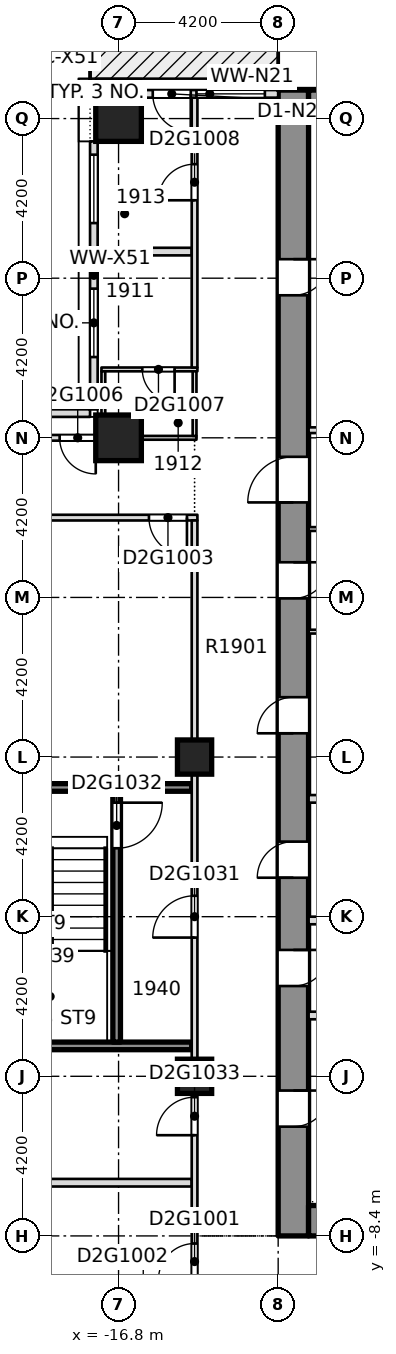
"""IFC4 building model, lengths in metres.
Left out: names, types, materials, properties, quantities, classifications, styles, units other than length and angle.
Written with IfcOpenShell. Run it as: python <this file> out.ifc"""

import sys

from ifc_helpers import new_model, si_unit, direction, frame, frame_2d, origin, origin_2d, place, context, subcontext, project, spatial, rectangle, extrude, element, fill, save


model = new_model("IFC4")
c1 = context("Model", 3, precision=1e-05, world=origin(), true_north=direction((0.0, 1.0)))
c2 = subcontext(c1, "Body", "Model", "MODEL_VIEW")
j1 = project(units=[si_unit("LENGTHUNIT", "METRE"), si_unit("PLANEANGLEUNIT", "RADIAN")], contexts=[c1])
p1 = place(None, origin())
s1 = spatial("IfcSite", under=j1, at=p1, CompositionType="ELEMENT")
p2 = place(p1, origin())
s2 = spatial("IfcBuilding", under=s1, at=p2, CompositionType="ELEMENT")
p3 = place(p2, frame((0.0, 0.0, 75.9)))
s3 = spatial("IfcBuildingStorey", under=s2, at=p3, CompositionType="ELEMENT", Elevation=75.9)
p4 = place(p3, frame((-12.15, -8.4, -0.5), z_axis=(0.0, 0.0, 1.0), x_axis=(0.0, 1.0, 0.0)))
e1 = element("IfcWall", 1, at=p4, inside=s3, PredefinedType="SHEAR", context=c2, shape_type="SweptSolid", body=[
    extrude(rectangle(XDim=30.15, YDim=0.9, at=frame_2d((15.075, 0.0))), origin(), (0.0, 0.0, 1.0), 4.68),
])
p5 = place(p4, frame((3.925, 0.0, 0.5)))
e2 = element("IfcOpeningElement", 2, at=p5, cuts=e1, PredefinedType="OPENING", context=c2, shape_type="SweptSolid", body=[
    extrude(rectangle(XDim=0.95, YDim=2.1, at=frame_2d((0.475, 1.05))), frame((0.0, 0.46, 0.0), z_axis=(0.0, -1.0, 0.0), x_axis=(1.0, 0.0, 0.0)), (0.0, 0.0, 1.0), 0.92),
])
p6 = place(p4, frame((9.175, 0.0, 0.5)))
e3 = element("IfcOpeningElement", 3, at=p6, cuts=e1, PredefinedType="OPENING", context=c2, shape_type="SweptSolid", body=[
    extrude(rectangle(XDim=0.95, YDim=2.1, at=frame_2d((0.475, 1.05))), frame((0.0, 0.46, 0.0), z_axis=(0.0, -1.0, 0.0), x_axis=(1.0, 0.0, 0.0)), (0.0, 0.0, 1.0), 0.92),
])
p7 = place(p4, frame((14.525, 0.0, 0.5)))
e4 = element("IfcOpeningElement", 4, at=p7, cuts=e1, PredefinedType="OPENING", context=c2, shape_type="SweptSolid", body=[
    extrude(rectangle(XDim=0.95, YDim=2.1, at=frame_2d((0.475, 1.05))), frame((0.0, 0.46, 0.0), z_axis=(0.0, -1.0, 0.0), x_axis=(1.0, 0.0, 0.0)), (0.0, 0.0, 1.0), 0.92),
])
p8 = place(p4, frame((22.225, 0.0, 0.5)))
e5 = element("IfcOpeningElement", 5, at=p8, cuts=e1, PredefinedType="OPENING", context=c2, shape_type="SweptSolid", body=[
    extrude(rectangle(XDim=0.95, YDim=2.1, at=frame_2d((0.475, 1.05))), frame((0.0, 0.46, 0.0), z_axis=(0.0, -1.0, 0.0), x_axis=(1.0, 0.0, 0.0)), (0.0, 0.0, 1.0), 0.92),
])
p9 = place(p4, frame((26.25, 0.0, 0.5)))
e6 = element("IfcOpeningElement", 6, at=p9, cuts=e1, PredefinedType="OPENING", context=c2, shape_type="SweptSolid", body=[
    extrude(rectangle(XDim=0.95, YDim=2.1, at=frame_2d((0.475, 1.05))), frame((0.0, 0.46, 0.0), z_axis=(0.0, -1.0, 0.0), x_axis=(1.0, 0.0, 0.0)), (0.0, 0.0, 1.0), 0.92),
])
p10 = place(p4, frame((19.3, 0.0, 0.5)))
e7 = element("IfcOpeningElement", 7, at=p10, cuts=e1, PredefinedType="OPENING", context=c2, shape_type="SweptSolid", body=[
    extrude(rectangle(XDim=1.2, YDim=2.1, at=frame_2d((0.6, 1.05))), frame((0.0, 0.46, 0.0), z_axis=(0.0, -1.0, 0.0), x_axis=(1.0, 0.0, 0.0)), (0.0, 0.0, 1.0), 0.92),
])
p11 = place(p3, frame((-11.7, -7.95, -0.5), z_axis=(0.0, 0.0, 1.0), x_axis=(1.0, 0.0, 0.0)))
e8 = element("IfcWall", 8, at=p11, inside=s3, PredefinedType="SHEAR", context=c2, shape_type="SweptSolid", body=[
    extrude(rectangle(XDim=23.4, YDim=0.9, at=frame_2d((11.7, 0.0))), origin(), (0.0, 0.0, 1.0), 4.68),
])
p12 = place(p11, frame((6.95, 0.0, 0.5)))
e9 = element("IfcOpeningElement", 9, at=p12, cuts=e8, PredefinedType="OPENING", context=c2, shape_type="SweptSolid", body=[
    extrude(rectangle(XDim=1.8, YDim=2.1, at=frame_2d((0.9, 1.05))), frame((0.0, 0.46, 0.0), z_axis=(0.0, -1.0, 0.0), x_axis=(1.0, 0.0, 0.0)), (0.0, 0.0, 1.0), 0.92),
])
p13 = place(p11, frame((14.65, 0.0, 0.5)))
e10 = element("IfcOpeningElement", 10, at=p13, cuts=e8, PredefinedType="OPENING", context=c2, shape_type="SweptSolid", body=[
    extrude(rectangle(XDim=1.8, YDim=2.1, at=frame_2d((0.9, 1.05))), frame((0.0, 0.46, 0.0), z_axis=(0.0, -1.0, 0.0), x_axis=(1.0, 0.0, 0.0)), (0.0, 0.0, 1.0), 0.92),
])
p14 = place(p3, frame((-11.7, 21.3, -0.5), z_axis=(0.0, 0.0, 1.0), x_axis=(1.0, 0.0, 0.0)))
e11 = element("IfcWall", 11, at=p14, inside=s3, PredefinedType="SOLIDWALL", context=c2, shape_type="SweptSolid", body=[
    extrude(rectangle(XDim=23.4, YDim=0.9, at=frame_2d((11.7, 0.0))), origin(), (0.0, 0.0, 1.0), 4.68),
])
p15 = place(p3, frame((-16.8, 21.0, -0.5), z_axis=(0.0, 0.0, 1.0), x_axis=(1.0, 0.0, 0.0)))
e12 = element("IfcColumn", 12, at=p15, inside=s3, PredefinedType="COLUMN", context=c2, shape_type="SweptSolid", body=[
    extrude(rectangle(XDim=1.4, YDim=1.4, at=origin_2d()), origin(), (0.0, 0.0, 1.0), 4.68),
])
for number, where, z_axis, x_axis in (
    (13, (-14.9, -4.2, 0.0), (0.0, 0.0, 1.0), (-1.0, 0.0, 0.0)),
    (14, (-14.9, 4.2, 0.0), (0.0, 0.0, 1.0), (-1.0, 0.0, 0.0)),
    (15, (-14.9, 12.6, 0.0), (0.0, 0.0, 1.0), (-1.0, 0.0, 0.0)),
):
    element("IfcWall", number, at=place(p3, frame(where, z_axis=z_axis, x_axis=x_axis)), inside=s3, PredefinedType="SHEAR", context=c2, shape_type="SweptSolid", body=[
        extrude(rectangle(XDim=10.3, YDim=0.6, at=frame_2d((5.15, 0.0))), origin(), (0.0, 0.0, 1.0), 4.18),
    ])
p16 = place(p3, frame((-22.125, -8.4, 0.0), z_axis=(0.0, 0.0, 1.0), x_axis=(1.0, 0.0, 0.0)))
e16 = element("IfcWall", 16, at=p16, inside=s3, PredefinedType="PARTITIONING", context=c2, shape_type="SweptSolid", body=[
    extrude(rectangle(XDim=7.4, YDim=0.15, at=frame_2d((3.7, 0.0))), origin(), (0.0, 0.0, 1.0), 4.18),
])
p17 = place(p16, frame((5.425, 0.0, 0.0)))
e17 = element("IfcOpeningElement", 17, at=p17, cuts=e16, PredefinedType="OPENING", context=c2, shape_type="SweptSolid", body=[
    extrude(rectangle(XDim=1.2, YDim=2.1, at=frame_2d((0.6, 1.05))), frame((0.0, 0.085, 0.0), z_axis=(0.0, -1.0, 0.0), x_axis=(1.0, 0.0, 0.0)), (0.0, 0.0, 1.0), 0.17),
])
p18 = place(p3, frame((-20.45, 3.507, 0.0), z_axis=(0.0, 0.0, 1.0), x_axis=(1.0, 0.0, 0.0)))
e18 = element("IfcWall", 18, at=p18, inside=s3, PredefinedType="SOLIDWALL", context=c2, shape_type="SweptSolid", body=[
    extrude(rectangle(XDim=5.575, YDim=0.2, at=frame_2d((2.788, 0.0))), origin(), (0.0, 0.0, 1.0), 4.18),
])
for number, where, z_axis, x_axis in (
    (19, (-25.75, 8.055, 0.0), (0.0, 0.0, 1.0), (1.0, 0.0, 0.0)),
    (20, (-25.75, 10.95, 0.0), (0.0, 0.0, 1.0), (1.0, 0.0, 0.0)),
):
    element("IfcWall", number, at=place(p3, frame(where, z_axis=z_axis, x_axis=x_axis)), inside=s3, PredefinedType="PARTITIONING", context=c2, shape_type="SweptSolid", body=[
        extrude(rectangle(XDim=10.875, YDim=0.2, at=frame_2d((5.438, 0.0))), origin(), (0.0, 0.0, 1.0), 4.18),
    ])
p19 = place(p3, frame((-17.35, 13.35, 0.0), z_axis=(0.0, 0.0, 1.0), x_axis=(1.0, 0.0, 0.0)))
e21 = element("IfcWall", 21, at=p19, inside=s3, PredefinedType="PARTITIONING", context=c2, shape_type="SweptSolid", body=[
    extrude(rectangle(XDim=2.475, YDim=0.2, at=frame_2d((1.238, 0.0))), origin(), (0.0, 0.0, 1.0), 4.18),
])
p20 = place(p3, frame((-14.8, -8.325, 0.0), z_axis=(0.0, 0.0, 1.0), x_axis=(0.0, 1.0, 0.0)))
e22 = element("IfcWall", 22, at=p20, inside=s3, PredefinedType="PARTITIONING", context=c2, shape_type="SweptSolid", body=[
    extrude(rectangle(XDim=29.875, YDim=0.15, at=frame_2d((14.938, 0.0))), origin(), (0.0, 0.0, 1.0), 4.18),
])
p21 = place(p20, frame((7.303, 0.0, 0.0)))
e23 = element("IfcOpeningElement", 23, at=p21, cuts=e22, PredefinedType="OPENING", context=c2, shape_type="SweptSolid", body=[
    extrude(rectangle(XDim=1.2, YDim=2.1, at=frame_2d((0.6, 1.05))), frame((0.0, 0.085, 0.0), z_axis=(0.0, -1.0, 0.0), x_axis=(1.0, 0.0, 0.0)), (0.0, 0.0, 1.0), 0.17),
])
p22 = place(p20, frame((13.506, 0.0, 0.0)))
e24 = element("IfcOpeningElement", 24, at=p22, cuts=e22, PredefinedType="OPENING", context=c2, shape_type="SweptSolid", body=[
    extrude(rectangle(XDim=1.2, YDim=2.1, at=frame_2d((0.6, 1.05))), frame((0.0, 0.085, 0.0), z_axis=(0.0, -1.0, 0.0), x_axis=(1.0, 0.0, 0.0)), (0.0, 0.0, 1.0), 0.17),
])
p23 = place(p20, frame((17.377, 0.0, 0.0)))
e25 = element("IfcOpeningElement", 25, at=p23, cuts=e22, PredefinedType="OPENING", context=c2, shape_type="SweptSolid", body=[
    extrude(rectangle(XDim=0.9, YDim=2.1, at=frame_2d((0.45, 1.05))), frame((0.0, 0.085, 0.0), z_axis=(0.0, -1.0, 0.0), x_axis=(1.0, 0.0, 0.0)), (0.0, 0.0, 1.0), 0.17),
])
p24 = place(p20, frame((19.375, 0.0, 0.0)))
e26 = element("IfcOpeningElement", 26, at=p24, cuts=e22, PredefinedType="OPENING", context=c2, shape_type="SweptSolid", body=[
    extrude(rectangle(XDim=1.2, YDim=2.1, at=frame_2d((0.6, 1.05))), frame((0.0, 0.085, 0.0), z_axis=(0.0, -1.0, 0.0), x_axis=(1.0, 0.0, 0.0)), (0.0, 0.0, 1.0), 0.17),
])
p25 = place(p20, frame((25.325, 0.0, 0.0)))
e27 = element("IfcOpeningElement", 27, at=p25, cuts=e22, PredefinedType="OPENING", context=c2, shape_type="SweptSolid", body=[
    extrude(rectangle(XDim=0.9, YDim=2.1, at=frame_2d((0.45, 1.05))), frame((0.0, 0.085, 0.0), z_axis=(0.0, -1.0, 0.0), x_axis=(1.0, 0.0, 0.0)), (0.0, 0.0, 1.0), 0.17),
])
p26 = place(p3, frame((-12.6, 21.65, 0.0), z_axis=(0.0, 0.0, 1.0), x_axis=(-1.0, 0.0, 0.0)))
e28 = element("IfcWall", 28, at=p26, inside=s3, PredefinedType="STANDARD", context=c2, shape_type="SweptSolid", body=[
    extrude(rectangle(XDim=3.5, YDim=0.2, at=frame_2d((1.75, 0.0))), origin(), (0.0, 0.0, 1.0), 4.18),
])
for number, where, z_axis, x_axis in (
    (29, (-17.45, 20.3, 0.0), (0.0, 0.0, 1.0), (0.0, -1.0, 0.0)),
    (30, (-17.55, 13.25, 0.0), (0.0, 0.0, 1.0), (-1.0, 0.0, 0.0)),
):
    element("IfcWall", number, at=place(p3, frame(where, z_axis=z_axis, x_axis=x_axis)), inside=s3, PredefinedType="STANDARD", context=c2, shape_type="SweptSolid", body=[
        extrude(rectangle(XDim=6.95, YDim=0.2, at=frame_2d((3.475, 0.0))), origin(), (0.0, 0.0, 1.0), 4.18),
    ])
for number, where, z_axis, x_axis in (
    (31, (-11.699, -0.5, 0.0), (0.0, 0.0, 1.0), (1.0, 0.0, 0.0)),
    (32, (-11.699, 3.0, 0.0), (0.0, 0.0, 1.0), (1.0, 0.0, 0.0)),
):
    element("IfcWall", number, at=place(p3, frame(where, z_axis=z_axis, x_axis=x_axis)), inside=s3, PredefinedType="PARTITIONING", context=c2, shape_type="SweptSolid", body=[
        extrude(rectangle(XDim=2.848, YDim=0.2, at=frame_2d((1.424, 0.0))), origin(), (0.0, 0.0, 1.0), 4.18),
    ])
p27 = place(p3, frame((-11.699, 10.2, 0.0), z_axis=(0.0, 0.0, 1.0), x_axis=(1.0, 0.0, 0.0)))
e33 = element("IfcWall", 33, at=p27, inside=s3, PredefinedType="PARTITIONING", context=c2, shape_type="SweptSolid", body=[
    extrude(rectangle(XDim=2.848, YDim=0.15, at=frame_2d((1.424, 0.0))), origin(), (0.0, 0.0, 1.0), 4.18),
])
for number, where, z_axis, x_axis in (
    (34, (-11.699, 12.8, 0.0), (0.0, 0.0, 1.0), (1.0, 0.0, 0.0)),
    (35, (-11.699, 15.8, 0.0), (0.0, 0.0, 1.0), (1.0, 0.0, 0.0)),
):
    element("IfcWall", number, at=place(p3, frame(where, z_axis=z_axis, x_axis=x_axis)), inside=s3, PredefinedType="PARTITIONING", context=c2, shape_type="SweptSolid", body=[
        extrude(rectangle(XDim=2.848, YDim=0.1, at=frame_2d((1.424, 0.0))), origin(), (0.0, 0.0, 1.0), 4.18),
    ])
p28 = place(p3, frame((-20.45, -3.4, 0.0), z_axis=(0.0, 0.0, 1.0), x_axis=(1.0, 0.0, 0.0)))
e36 = element("IfcWall", 36, at=p28, inside=s3, PredefinedType="SOLIDWALL", context=c2, shape_type="SweptSolid", body=[
    extrude(rectangle(XDim=3.7, YDim=0.2, at=frame_2d((1.85, 0.0))), origin(), (0.0, 0.0, 1.0), 4.18),
])
p29 = place(p3, frame((-16.85, -3.3, 0.0), z_axis=(0.0, 0.0, 1.0), x_axis=(0.0, 1.0, 0.0)))
e37 = element("IfcWall", 37, at=p29, inside=s3, PredefinedType="SOLIDWALL", context=c2, shape_type="SweptSolid", body=[
    extrude(rectangle(XDim=6.6, YDim=0.2, at=frame_2d((3.3, 0.0))), origin(), (0.0, 0.0, 1.0), 4.18),
])
p30 = place(p17, origin())
e38 = element("IfcDoor", 38, at=p30, inside=s3, OperationType="SINGLE_SWING_LEFT", PredefinedType="DOOR", context=c2, shape_type="SweptSolid", body=[
    extrude(rectangle(XDim=1.2, YDim=2.1, at=frame_2d((0.6, 1.05))), frame((0.0, 0.025, 0.0), z_axis=(0.0, -1.0, 0.0), x_axis=(1.0, 0.0, 0.0)), (0.0, 0.0, 1.0), 0.05),
])
fill(e17, e38)
p31 = place(p21, origin())
e39 = element("IfcDoor", 39, at=p31, inside=s3, OperationType="SINGLE_SWING_RIGHT", PredefinedType="DOOR", context=c2, shape_type="SweptSolid", body=[
    extrude(rectangle(XDim=1.2, YDim=2.1, at=frame_2d((0.6, 1.05))), frame((0.0, 0.025, 0.0), z_axis=(0.0, -1.0, 0.0), x_axis=(1.0, 0.0, 0.0)), (0.0, 0.0, 1.0), 0.05),
])
fill(e23, e39)
p32 = place(p22, origin())
e40 = element("IfcDoor", 40, at=p32, inside=s3, OperationType="SINGLE_SWING_LEFT", PredefinedType="DOOR", context=c2, shape_type="SweptSolid", body=[
    extrude(rectangle(XDim=1.2, YDim=2.1, at=frame_2d((0.6, 1.05))), frame((0.0, 0.025, 0.0), z_axis=(0.0, -1.0, 0.0), x_axis=(1.0, 0.0, 0.0)), (0.0, 0.0, 1.0), 0.05),
])
fill(e24, e40)
p33 = place(p23, origin())
e41 = element("IfcDoor", 41, at=p33, inside=s3, OperationType="SINGLE_SWING_RIGHT", PredefinedType="DOOR", context=c2, shape_type="SweptSolid", body=[
    extrude(rectangle(XDim=0.9, YDim=2.1, at=frame_2d((0.45, 1.05))), frame((0.0, 0.025, 0.0), z_axis=(0.0, -1.0, 0.0), x_axis=(1.0, 0.0, 0.0)), (0.0, 0.0, 1.0), 0.05),
])
fill(e25, e41)
p34 = place(p24, origin())
e42 = element("IfcDoor", 42, at=p34, inside=s3, OperationType="SINGLE_SWING_LEFT", PredefinedType="DOOR", context=c2, shape_type="SweptSolid", body=[
    extrude(rectangle(XDim=1.2, YDim=2.1, at=frame_2d((0.6, 1.05))), frame((0.0, 0.025, 0.0), z_axis=(0.0, -1.0, 0.0), x_axis=(1.0, 0.0, 0.0)), (0.0, 0.0, 1.0), 0.05),
])
fill(e26, e42)
p35 = place(p25, origin())
e43 = element("IfcDoor", 43, at=p35, inside=s3, OperationType="SINGLE_SWING_LEFT", PredefinedType="DOOR", context=c2, shape_type="SweptSolid", body=[
    extrude(rectangle(XDim=0.9, YDim=2.1, at=frame_2d((0.45, 1.05))), frame((0.0, 0.025, 0.0), z_axis=(0.0, -1.0, 0.0), x_axis=(1.0, 0.0, 0.0)), (0.0, 0.0, 1.0), 0.05),
])
fill(e27, e43)
p36 = place(p5, origin())
e44 = element("IfcDoor", 44, at=p36, inside=s3, OperationType="SINGLE_SWING_LEFT", PredefinedType="DOOR", context=c2, shape_type="SweptSolid", body=[
    extrude(rectangle(XDim=0.95, YDim=2.1, at=frame_2d((0.475, 1.05))), frame((0.0, 0.025, 0.0), z_axis=(0.0, -1.0, 0.0), x_axis=(1.0, 0.0, 0.0)), (0.0, 0.0, 1.0), 0.05),
])
fill(e2, e44)
p37 = place(p6, origin())
e45 = element("IfcDoor", 45, at=p37, inside=s3, OperationType="SINGLE_SWING_LEFT", PredefinedType="DOOR", context=c2, shape_type="SweptSolid", body=[
    extrude(rectangle(XDim=0.95, YDim=2.1, at=frame_2d((0.475, 1.05))), frame((0.0, 0.025, 0.0), z_axis=(0.0, -1.0, 0.0), x_axis=(1.0, 0.0, 0.0)), (0.0, 0.0, 1.0), 0.05),
])
fill(e3, e45)
p38 = place(p7, origin())
e46 = element("IfcDoor", 46, at=p38, inside=s3, OperationType="SINGLE_SWING_LEFT", PredefinedType="DOOR", context=c2, shape_type="SweptSolid", body=[
    extrude(rectangle(XDim=0.95, YDim=2.1, at=frame_2d((0.475, 1.05))), frame((0.0, 0.025, 0.0), z_axis=(0.0, -1.0, 0.0), x_axis=(1.0, 0.0, 0.0)), (0.0, 0.0, 1.0), 0.05),
])
fill(e4, e46)
p39 = place(p8, origin())
e47 = element("IfcDoor", 47, at=p39, inside=s3, OperationType="SINGLE_SWING_LEFT", PredefinedType="DOOR", context=c2, shape_type="SweptSolid", body=[
    extrude(rectangle(XDim=0.95, YDim=2.1, at=frame_2d((0.475, 1.05))), frame((0.0, 0.025, 0.0), z_axis=(0.0, -1.0, 0.0), x_axis=(1.0, 0.0, 0.0)), (0.0, 0.0, 1.0), 0.05),
])
fill(e5, e47)
p40 = place(p9, origin())
e48 = element("IfcDoor", 48, at=p40, inside=s3, OperationType="SINGLE_SWING_LEFT", PredefinedType="DOOR", context=c2, shape_type="SweptSolid", body=[
    extrude(rectangle(XDim=0.95, YDim=2.1, at=frame_2d((0.475, 1.05))), frame((0.0, 0.025, 0.0), z_axis=(0.0, -1.0, 0.0), x_axis=(1.0, 0.0, 0.0)), (0.0, 0.0, 1.0), 0.05),
])
fill(e6, e48)
p41 = place(p10, origin())
e49 = element("IfcDoor", 49, at=p41, inside=s3, OperationType="SINGLE_SWING_LEFT", PredefinedType="DOOR", context=c2, shape_type="SweptSolid", body=[
    extrude(rectangle(XDim=1.2, YDim=2.1, at=frame_2d((0.6, 1.05))), frame((0.0, 0.025, 0.0), z_axis=(0.0, -1.0, 0.0), x_axis=(1.0, 0.0, 0.0)), (0.0, 0.0, 1.0), 0.05),
])
fill(e7, e49)
save(model, sys.argv[1])
